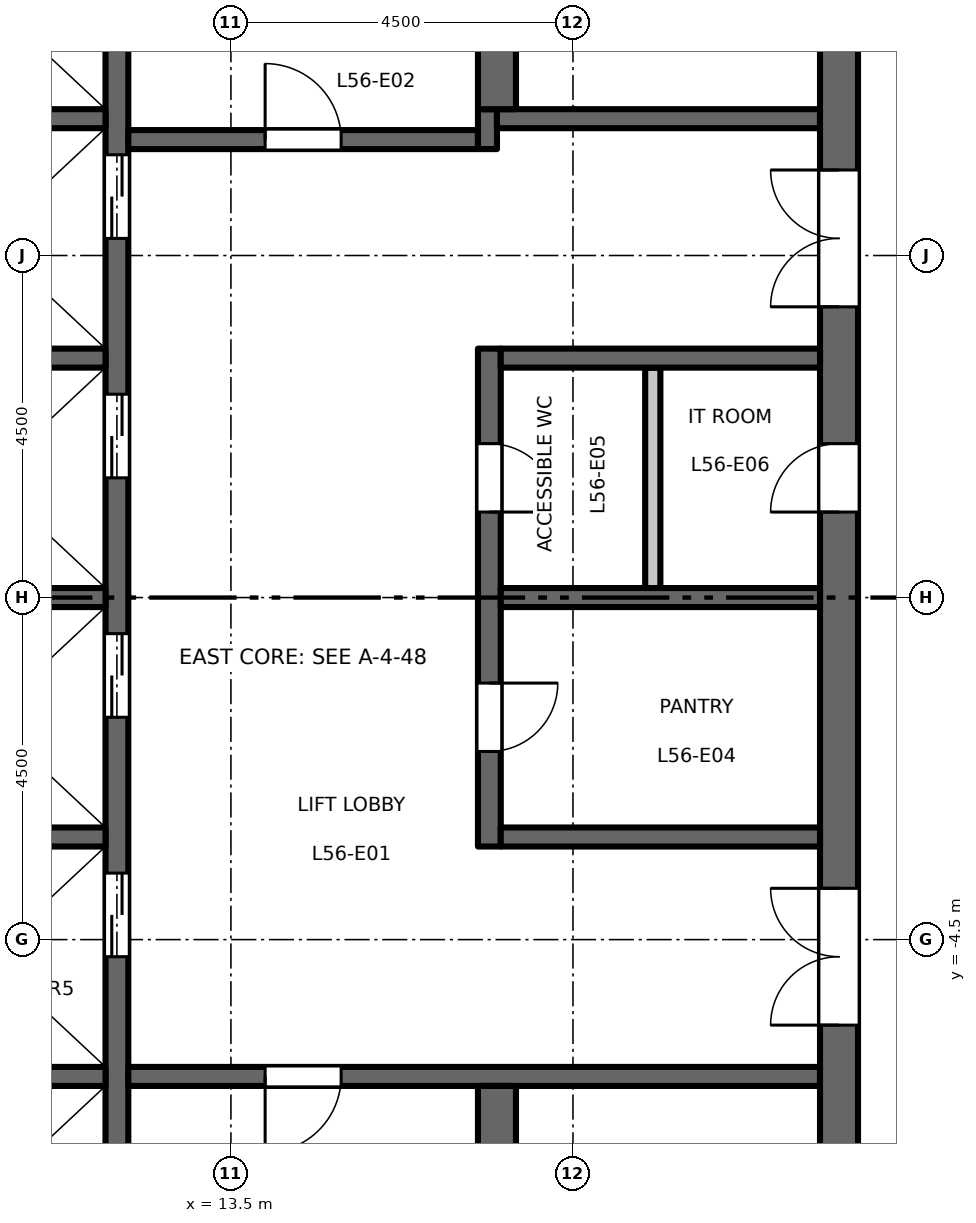
"""IFC4 building model, lengths in metres.
Left out: names, types, materials, properties, quantities, classifications, styles, units other than length and angle.
Written with IfcOpenShell. Run it as: python <this file> out.ifc"""

import sys

from ifc_helpers import new_model, si_unit, direction, frame, frame_2d, origin, place, context, subcontext, project, spatial, rectangle, extrude, element, fill, save


model = new_model("IFC4")
c1 = context("Model", 3, precision=1e-05, world=origin(), true_north=direction((0.0, 1.0)))
c2 = subcontext(c1, "Body", "Model", "MODEL_VIEW")
j1 = project(units=[si_unit("LENGTHUNIT", "METRE"), si_unit("PLANEANGLEUNIT", "RADIAN")], contexts=[c1])
p1 = place(None, origin())
s1 = spatial("IfcSite", under=j1, at=p1, CompositionType="ELEMENT")
p2 = place(p1, origin())
s2 = spatial("IfcBuilding", under=s1, at=p2, CompositionType="ELEMENT")
p3 = place(p2, frame((0.0, 0.0, 260.2)))
s3 = spatial("IfcBuildingStorey", under=s2, at=p3, CompositionType="ELEMENT", Elevation=260.2)
p4 = place(p3, frame((12.0, -9.45, 0.0), z_axis=(0.0, 0.0, 1.0), x_axis=(0.0, 1.0, 0.0)))
e1 = element("IfcWall", 1, at=p4, inside=s3, PredefinedType="SHEAR", context=c2, shape_type="SweptSolid", body=[
    extrude(rectangle(XDim=18.9, YDim=0.3, at=frame_2d((9.45, 0.0))), origin(), (0.0, 0.0, 1.0), 4.35),
])
p5 = place(p4, frame((4.725, 0.0, 0.0)))
e2 = element("IfcOpeningElement", 2, at=p5, cuts=e1, PredefinedType="OPENING", context=c2, shape_type="SweptSolid", body=[
    extrude(rectangle(XDim=1.1, YDim=2.1, at=frame_2d((0.55, 1.05))), frame((0.0, 0.16, 0.0), z_axis=(0.0, -1.0, 0.0), x_axis=(1.0, 0.0, 0.0)), (0.0, 0.0, 1.0), 0.32),
])
p6 = place(p4, frame((7.875, 0.0, 0.0)))
e3 = element("IfcOpeningElement", 3, at=p6, cuts=e1, PredefinedType="OPENING", context=c2, shape_type="SweptSolid", body=[
    extrude(rectangle(XDim=1.1, YDim=2.1, at=frame_2d((0.55, 1.05))), frame((0.0, 0.16, 0.0), z_axis=(0.0, -1.0, 0.0), x_axis=(1.0, 0.0, 0.0)), (0.0, 0.0, 1.0), 0.32),
])
p7 = place(p4, frame((11.025, 0.0, 0.0)))
e4 = element("IfcOpeningElement", 4, at=p7, cuts=e1, PredefinedType="OPENING", context=c2, shape_type="SweptSolid", body=[
    extrude(rectangle(XDim=1.1, YDim=2.1, at=frame_2d((0.55, 1.05))), frame((0.0, 0.16, 0.0), z_axis=(0.0, -1.0, 0.0), x_axis=(1.0, 0.0, 0.0)), (0.0, 0.0, 1.0), 0.32),
])
p8 = place(p4, frame((14.175, 0.0, 0.0)))
e5 = element("IfcOpeningElement", 5, at=p8, cuts=e1, PredefinedType="OPENING", context=c2, shape_type="SweptSolid", body=[
    extrude(rectangle(XDim=1.1, YDim=2.1, at=frame_2d((0.55, 1.05))), frame((0.0, 0.16, 0.0), z_axis=(0.0, -1.0, 0.0), x_axis=(1.0, 0.0, 0.0)), (0.0, 0.0, 1.0), 0.32),
])
p9 = place(p4, frame((16.725, 0.0, 0.0)))
e6 = element("IfcOpeningElement", 6, at=p9, cuts=e1, PredefinedType="OPENING", context=c2, shape_type="SweptSolid", body=[
    extrude(rectangle(XDim=1.2, YDim=2.1, at=frame_2d((0.6, 1.05))), frame((0.0, 0.16, 0.0), z_axis=(0.0, -1.0, 0.0), x_axis=(1.0, 0.0, 0.0)), (0.0, 0.0, 1.0), 0.32),
])
p10 = place(p4, frame((0.975, 0.0, 0.0)))
e7 = element("IfcOpeningElement", 7, at=p10, cuts=e1, PredefinedType="OPENING", context=c2, shape_type="SweptSolid", body=[
    extrude(rectangle(XDim=1.2, YDim=2.1, at=frame_2d((0.6, 1.05))), frame((0.0, 0.16, 0.0), z_axis=(0.0, -1.0, 0.0), x_axis=(1.0, 0.0, 0.0)), (0.0, 0.0, 1.0), 0.32),
])
p11 = place(p3, frame((12.15, 6.025, 0.0), z_axis=(0.0, 0.0, 1.0), x_axis=(1.0, 0.0, 0.0)))
e8 = element("IfcWall", 8, at=p11, inside=s3, PredefinedType="SHEAR", context=c2, shape_type="SweptSolid", body=[
    extrude(rectangle(XDim=4.6, YDim=0.25, at=frame_2d((2.3, 0.0))), origin(), (0.0, 0.0, 1.0), 4.35),
])
p12 = place(p11, frame((1.8, 0.0, 0.0)))
e9 = element("IfcOpeningElement", 9, at=p12, cuts=e8, PredefinedType="OPENING", context=c2, shape_type="SweptSolid", body=[
    extrude(rectangle(XDim=1.0, YDim=2.1, at=frame_2d((0.5, 1.05))), frame((0.0, 0.135, 0.0), z_axis=(0.0, -1.0, 0.0), x_axis=(1.0, 0.0, 0.0)), (0.0, 0.0, 1.0), 0.27),
])
p13 = place(p3, frame((16.875, 5.9, 0.0), z_axis=(0.0, 0.0, 1.0), x_axis=(0.0, 1.0, 0.0)))
e10 = element("IfcWall", 10, at=p13, inside=s3, PredefinedType="SHEAR", context=c2, shape_type="SweptSolid", body=[
    extrude(rectangle(XDim=0.525, YDim=0.25, at=frame_2d((0.263, 0.0))), origin(), (0.0, 0.0, 1.0), 4.35),
])
p14 = place(p3, frame((17.0, 6.3, 0.0), z_axis=(0.0, 0.0, 1.0), x_axis=(1.0, 0.0, 0.0)))
e11 = element("IfcWall", 11, at=p14, inside=s3, PredefinedType="SHEAR", context=c2, shape_type="SweptSolid", body=[
    extrude(rectangle(XDim=4.25, YDim=0.25, at=frame_2d((2.125, 0.0))), origin(), (0.0, 0.0, 1.0), 4.35),
])
p15 = place(p3, frame((12.15, -6.3, 0.0), z_axis=(0.0, 0.0, 1.0), x_axis=(1.0, 0.0, 0.0)))
e12 = element("IfcWall", 12, at=p15, inside=s3, PredefinedType="SHEAR", context=c2, shape_type="SweptSolid", body=[
    extrude(rectangle(XDim=9.1, YDim=0.25, at=frame_2d((4.55, 0.0))), origin(), (0.0, 0.0, 1.0), 4.35),
])
p16 = place(p15, frame((1.8, 0.0, 0.0)))
e13 = element("IfcOpeningElement", 13, at=p16, cuts=e12, PredefinedType="OPENING", context=c2, shape_type="SweptSolid", body=[
    extrude(rectangle(XDim=1.0, YDim=2.1, at=frame_2d((0.5, 1.05))), frame((0.0, 0.135, 0.0), z_axis=(0.0, -1.0, 0.0), x_axis=(1.0, 0.0, 0.0)), (0.0, 0.0, 1.0), 0.27),
])
p17 = place(p3, frame((21.5, -13.0, 0.0), z_axis=(0.0, 0.0, 1.0), x_axis=(0.0, 1.0, 0.0)))
e14 = element("IfcWall", 14, at=p17, inside=s3, PredefinedType="SHEAR", context=c2, shape_type="SweptSolid", body=[
    extrude(rectangle(XDim=26.0, YDim=0.5, at=frame_2d((13.0, 0.0))), origin(), (0.0, 0.0, 1.0), 4.35),
])
p18 = place(p17, frame((16.825, 0.0, 0.0)))
e15 = element("IfcOpeningElement", 15, at=p18, cuts=e14, PredefinedType="OPENING", context=c2, shape_type="SweptSolid", body=[
    extrude(rectangle(XDim=1.8, YDim=2.1, at=frame_2d((0.9, 1.05))), frame((0.0, 0.26, 0.0), z_axis=(0.0, -1.0, 0.0), x_axis=(1.0, 0.0, 0.0)), (0.0, 0.0, 1.0), 0.52),
])
p19 = place(p17, frame((7.375, 0.0, 0.0)))
e16 = element("IfcOpeningElement", 16, at=p19, cuts=e14, PredefinedType="OPENING", context=c2, shape_type="SweptSolid", body=[
    extrude(rectangle(XDim=1.8, YDim=2.1, at=frame_2d((0.9, 1.05))), frame((0.0, 0.26, 0.0), z_axis=(0.0, -1.0, 0.0), x_axis=(1.0, 0.0, 0.0)), (0.0, 0.0, 1.0), 0.52),
])
p20 = place(p17, frame((14.125, 0.0, 0.0)))
e17 = element("IfcOpeningElement", 17, at=p20, cuts=e14, PredefinedType="OPENING", context=c2, shape_type="SweptSolid", body=[
    extrude(rectangle(XDim=0.9, YDim=2.1, at=frame_2d((0.45, 1.05))), frame((0.0, 0.26, 0.0), z_axis=(0.0, -1.0, 0.0), x_axis=(1.0, 0.0, 0.0)), (0.0, 0.0, 1.0), 0.52),
])
p21 = place(p3, frame((16.9, -3.275, 0.0), z_axis=(0.0, 0.0, 1.0), x_axis=(0.0, 1.0, 0.0)))
e18 = element("IfcWall", 18, at=p21, inside=s3, PredefinedType="SHEAR", context=c2, shape_type="SweptSolid", body=[
    extrude(rectangle(XDim=6.55, YDim=0.3, at=frame_2d((3.275, 0.0))), origin(), (0.0, 0.0, 1.0), 4.35),
])
p22 = place(p21, frame((1.25, 0.0, 0.0)))
e19 = element("IfcOpeningElement", 19, at=p22, cuts=e18, PredefinedType="OPENING", context=c2, shape_type="SweptSolid", body=[
    extrude(rectangle(XDim=0.9, YDim=2.1, at=frame_2d((0.45, 1.05))), frame((0.0, 0.16, 0.0), z_axis=(0.0, -1.0, 0.0), x_axis=(1.0, 0.0, 0.0)), (0.0, 0.0, 1.0), 0.32),
])
p23 = place(p21, frame((4.4, 0.0, 0.0)))
e20 = element("IfcOpeningElement", 20, at=p23, cuts=e18, PredefinedType="OPENING", context=c2, shape_type="SweptSolid", body=[
    extrude(rectangle(XDim=0.9, YDim=2.1, at=frame_2d((0.45, 1.05))), frame((0.0, 0.16, 0.0), z_axis=(0.0, -1.0, 0.0), x_axis=(1.0, 0.0, 0.0)), (0.0, 0.0, 1.0), 0.32),
])
for number, where, z_axis, x_axis in (
    (21, (17.05, 0.0, 0.0), (0.0, 0.0, 1.0), (1.0, 0.0, 0.0)),
    (22, (17.05, 3.15, 0.0), (0.0, 0.0, 1.0), (1.0, 0.0, 0.0)),
    (23, (17.05, -3.15, 0.0), (0.0, 0.0, 1.0), (1.0, 0.0, 0.0)),
):
    element("IfcWall", number, at=place(p3, frame(where, z_axis=z_axis, x_axis=x_axis)), inside=s3, PredefinedType="SHEAR", context=c2, shape_type="SweptSolid", body=[
        extrude(rectangle(XDim=4.2, YDim=0.25, at=frame_2d((2.1, 0.0))), origin(), (0.0, 0.0, 1.0), 4.35),
    ])
p24 = place(p3, frame((19.05, 0.125, 0.0), z_axis=(0.0, 0.0, 1.0), x_axis=(0.0, 1.0, 0.0)))
e24 = element("IfcWall", 24, at=p24, inside=s3, PredefinedType="PARTITIONING", context=c2, shape_type="SweptSolid", body=[
    extrude(rectangle(XDim=2.9, YDim=0.2, at=frame_2d((1.45, 0.0))), origin(), (0.0, 0.0, 1.0), 4.35),
])
for number, where, z_axis, x_axis in (
    (25, (17.0, 6.425, 0.0), (0.0, 0.0, 1.0), (0.0, 1.0, 0.0)),
    (26, (17.0, -13.0, 0.0), (0.0, 0.0, 1.0), (0.0, 1.0, 0.0)),
):
    element("IfcWall", number, at=place(p3, frame(where, z_axis=z_axis, x_axis=x_axis)), inside=s3, PredefinedType="SHEAR", context=c2, shape_type="SweptSolid", body=[
        extrude(rectangle(XDim=6.575, YDim=0.5, at=frame_2d((3.288, 0.0))), origin(), (0.0, 0.0, 1.0), 4.35),
    ])
for number, where, z_axis, x_axis in (
    (27, (8.75, 0.0, 0.0), (0.0, 0.0, 1.0), (1.0, 0.0, 0.0)),
    (28, (8.75, 3.15, 0.0), (0.0, 0.0, 1.0), (1.0, 0.0, 0.0)),
    (29, (8.75, 6.3, 0.0), (0.0, 0.0, 1.0), (1.0, 0.0, 0.0)),
    (30, (8.75, -3.15, 0.0), (0.0, 0.0, 1.0), (1.0, 0.0, 0.0)),
    (31, (8.75, -6.3, 0.0), (0.0, 0.0, 1.0), (1.0, 0.0, 0.0)),
):
    element("IfcWall", number, at=place(p3, frame(where, z_axis=z_axis, x_axis=x_axis)), inside=s3, PredefinedType="SHEAR", context=c2, shape_type="SweptSolid", body=[
        extrude(rectangle(XDim=3.1, YDim=0.25, at=frame_2d((1.55, 0.0))), origin(), (0.0, 0.0, 1.0), 4.35),
    ])
p25 = place(p12, origin())
e32 = element("IfcDoor", 32, at=p25, inside=s3, OperationType="SINGLE_SWING_RIGHT", PredefinedType="DOOR", context=c2, shape_type="SweptSolid", body=[
    extrude(rectangle(XDim=1.0, YDim=2.1, at=frame_2d((0.5, 1.05))), frame((0.0, 0.025, 0.0), z_axis=(0.0, -1.0, 0.0), x_axis=(1.0, 0.0, 0.0)), (0.0, 0.0, 1.0), 0.05),
])
fill(e9, e32)
p26 = place(p16, origin())
e33 = element("IfcDoor", 33, at=p26, inside=s3, OperationType="SINGLE_SWING_LEFT", PredefinedType="DOOR", context=c2, shape_type="SweptSolid", body=[
    extrude(rectangle(XDim=1.0, YDim=2.1, at=frame_2d((0.5, 1.05))), frame((0.0, 0.025, 0.0), z_axis=(0.0, -1.0, 0.0), x_axis=(1.0, 0.0, 0.0)), (0.0, 0.0, 1.0), 0.05),
])
fill(e13, e33)
p27 = place(p18, origin())
e34 = element("IfcDoor", 34, at=p27, inside=s3, OperationType="DOUBLE_DOOR_DOUBLE_SWING", PredefinedType="DOOR", context=c2, shape_type="SweptSolid", body=[
    extrude(rectangle(XDim=1.8, YDim=2.1, at=frame_2d((0.9, 1.05))), frame((0.0, 0.025, 0.0), z_axis=(0.0, -1.0, 0.0), x_axis=(1.0, 0.0, 0.0)), (0.0, 0.0, 1.0), 0.05),
])
fill(e15, e34)
p28 = place(p19, origin())
e35 = element("IfcDoor", 35, at=p28, inside=s3, OperationType="DOUBLE_DOOR_DOUBLE_SWING", PredefinedType="DOOR", context=c2, shape_type="SweptSolid", body=[
    extrude(rectangle(XDim=1.8, YDim=2.1, at=frame_2d((0.9, 1.05))), frame((0.0, 0.025, 0.0), z_axis=(0.0, -1.0, 0.0), x_axis=(1.0, 0.0, 0.0)), (0.0, 0.0, 1.0), 0.05),
])
fill(e16, e35)
p29 = place(p5, origin())
e36 = element("IfcDoor", 36, at=p29, inside=s3, OperationType="DOUBLE_DOOR_SLIDING", PredefinedType="DOOR", context=c2, shape_type="SweptSolid", body=[
    extrude(rectangle(XDim=1.1, YDim=2.1, at=frame_2d((0.55, 1.05))), frame((0.0, 0.025, 0.0), z_axis=(0.0, -1.0, 0.0), x_axis=(1.0, 0.0, 0.0)), (0.0, 0.0, 1.0), 0.05),
])
fill(e2, e36)
p30 = place(p6, origin())
e37 = element("IfcDoor", 37, at=p30, inside=s3, OperationType="DOUBLE_DOOR_SLIDING", PredefinedType="DOOR", context=c2, shape_type="SweptSolid", body=[
    extrude(rectangle(XDim=1.1, YDim=2.1, at=frame_2d((0.55, 1.05))), frame((0.0, 0.025, 0.0), z_axis=(0.0, -1.0, 0.0), x_axis=(1.0, 0.0, 0.0)), (0.0, 0.0, 1.0), 0.05),
])
fill(e3, e37)
p31 = place(p7, origin())
e38 = element("IfcDoor", 38, at=p31, inside=s3, OperationType="DOUBLE_DOOR_SLIDING", PredefinedType="DOOR", context=c2, shape_type="SweptSolid", body=[
    extrude(rectangle(XDim=1.1, YDim=2.1, at=frame_2d((0.55, 1.05))), frame((0.0, 0.025, 0.0), z_axis=(0.0, -1.0, 0.0), x_axis=(1.0, 0.0, 0.0)), (0.0, 0.0, 1.0), 0.05),
])
fill(e4, e38)
p32 = place(p8, origin())
e39 = element("IfcDoor", 39, at=p32, inside=s3, OperationType="DOUBLE_DOOR_SLIDING", PredefinedType="DOOR", context=c2, shape_type="SweptSolid", body=[
    extrude(rectangle(XDim=1.1, YDim=2.1, at=frame_2d((0.55, 1.05))), frame((0.0, 0.025, 0.0), z_axis=(0.0, -1.0, 0.0), x_axis=(1.0, 0.0, 0.0)), (0.0, 0.0, 1.0), 0.05),
])
fill(e5, e39)
p33 = place(p22, origin())
e40 = element("IfcDoor", 40, at=p33, inside=s3, OperationType="SINGLE_SWING_RIGHT", PredefinedType="DOOR", context=c2, shape_type="SweptSolid", body=[
    extrude(rectangle(XDim=0.9, YDim=2.1, at=frame_2d((0.45, 1.05))), frame((0.0, 0.025, 0.0), z_axis=(0.0, -1.0, 0.0), x_axis=(1.0, 0.0, 0.0)), (0.0, 0.0, 1.0), 0.05),
])
fill(e19, e40)
p34 = place(p23, origin())
e41 = element("IfcDoor", 41, at=p34, inside=s3, OperationType="SINGLE_SWING_LEFT", PredefinedType="DOOR", context=c2, shape_type="SweptSolid", body=[
    extrude(rectangle(XDim=0.9, YDim=2.1, at=frame_2d((0.45, 1.05))), frame((0.0, 0.025, 0.0), z_axis=(0.0, -1.0, 0.0), x_axis=(1.0, 0.0, 0.0)), (0.0, 0.0, 1.0), 0.05),
])
fill(e20, e41)
p35 = place(p20, origin())
e42 = element("IfcDoor", 42, at=p35, inside=s3, OperationType="SINGLE_SWING_RIGHT", PredefinedType="DOOR", context=c2, shape_type="SweptSolid", body=[
    extrude(rectangle(XDim=0.9, YDim=2.1, at=frame_2d((0.45, 1.05))), frame((0.0, 0.025, 0.0), z_axis=(0.0, -1.0, 0.0), x_axis=(1.0, 0.0, 0.0)), (0.0, 0.0, 1.0), 0.05),
])
fill(e17, e42)
save(model, sys.argv[1])
